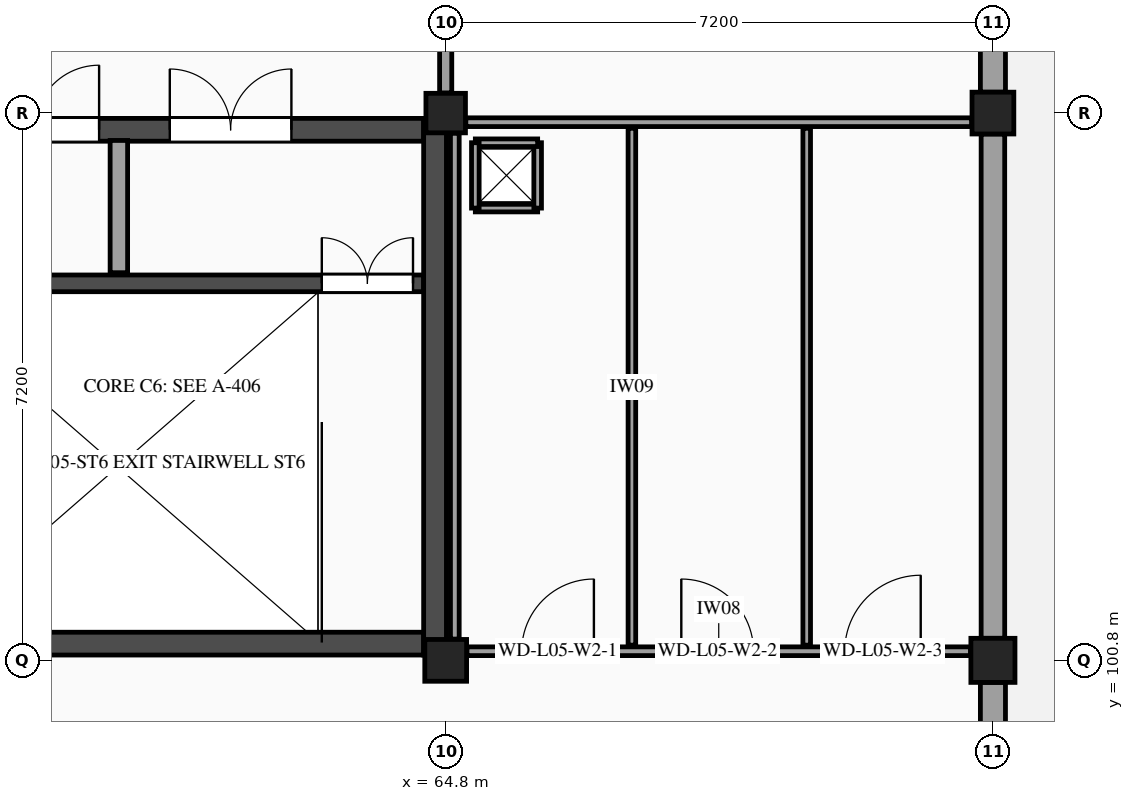
"""IFC4 building model, lengths in metres.
Left out: names, types, materials, properties, quantities, classifications, styles, units other than length and angle.
Written with IfcOpenShell. Run it as: python <this file> out.ifc"""

import sys

from ifc_helpers import new_model, si_unit, direction, frame, frame_2d, origin, origin_2d, place, context, subcontext, project, spatial, rectangle, extrude, element, fill, save


model = new_model("IFC4")
c1 = context("Model", 3, precision=1e-05, world=origin(), true_north=direction((0.0, 1.0)))
c2 = subcontext(c1, "Body", "Model", "MODEL_VIEW")
j1 = project(units=[si_unit("LENGTHUNIT", "METRE"), si_unit("PLANEANGLEUNIT", "RADIAN")], contexts=[c1])
p1 = place(None, origin())
s1 = spatial("IfcSite", under=j1, at=p1, CompositionType="ELEMENT")
p2 = place(p1, origin())
s2 = spatial("IfcBuilding", under=s1, at=p2, CompositionType="ELEMENT")
p3 = place(p2, frame((0.0, 0.0, 22.8)))
s3 = spatial("IfcBuildingStorey", under=s2, at=p3, CompositionType="ELEMENT", Elevation=22.8)
p4 = place(p3, frame((64.8, 100.8, 0.0), z_axis=(0.0, 0.0, 1.0), x_axis=(1.0, 0.0, 0.0)))
e1 = element("IfcColumn", 1, at=p4, inside=s3, PredefinedType="COLUMN", context=c2, shape_type="SweptSolid", body=[
    extrude(rectangle(XDim=0.55, YDim=0.55, at=origin_2d()), origin(), (0.0, 0.0, 1.0), 3.9),
])
p5 = place(p3, frame((64.8, 108.0, 0.0), z_axis=(0.0, 0.0, 1.0), x_axis=(1.0, 0.0, 0.0)))
e2 = element("IfcColumn", 2, at=p5, inside=s3, PredefinedType="COLUMN", context=c2, shape_type="SweptSolid", body=[
    extrude(rectangle(XDim=0.52, YDim=0.52, at=origin_2d()), origin(), (0.0, 0.0, 1.0), 3.9),
])
p6 = place(p3, frame((72.0, 100.8, 0.0), z_axis=(0.0, 0.0, 1.0), x_axis=(1.0, 0.0, 0.0)))
e3 = element("IfcColumn", 3, at=p6, inside=s3, PredefinedType="COLUMN", context=c2, shape_type="SweptSolid", body=[
    extrude(rectangle(XDim=0.58, YDim=0.58, at=origin_2d()), origin(), (0.0, 0.0, 1.0), 3.9),
])
p7 = place(p3, frame((72.0, 108.0, 0.0), z_axis=(0.0, 0.0, 1.0), x_axis=(1.0, 0.0, 0.0)))
e4 = element("IfcColumn", 4, at=p7, inside=s3, PredefinedType="COLUMN", context=c2, shape_type="SweptSolid", body=[
    extrude(rectangle(XDim=0.55, YDim=0.55, at=origin_2d()), origin(), (0.0, 0.0, 1.0), 3.9),
])
p8 = place(p3, frame((72.0, 114.94, 0.0), z_axis=(0.0, 0.0, 1.0), x_axis=(0.0, -1.0, 0.0)))
e5 = element("IfcWall", 5, at=p8, inside=s3, PredefinedType="STANDARD", context=c2, shape_type="SweptSolid", body=[
    extrude(rectangle(XDim=6.665, YDim=0.33, at=frame_2d((3.333, 0.0))), origin(), (0.0, 0.0, 1.0), 3.095),
])
p9 = place(p8, frame((2.782, 0.0, 0.0)))
e6 = element("IfcOpeningElement", 6, at=p9, cuts=e5, PredefinedType="OPENING", context=c2, shape_type="SweptSolid", body=[
    extrude(rectangle(XDim=1.1, YDim=2.2, at=frame_2d((0.55, 1.1))), frame((0.0, 0.175, 0.0), z_axis=(0.0, -1.0, 0.0), x_axis=(1.0, 0.0, 0.0)), (0.0, 0.0, 1.0), 0.35),
])
p10 = place(p3, frame((72.0, 107.725, 0.0), z_axis=(0.0, 0.0, 1.0), x_axis=(0.0, -1.0, 0.0)))
e7 = element("IfcWall", 7, at=p10, inside=s3, PredefinedType="STANDARD", context=c2, shape_type="SweptSolid", body=[
    extrude(rectangle(XDim=6.635, YDim=0.31, at=frame_2d((3.317, 0.0))), origin(), (0.0, 0.0, 1.0), 3.095),
])
p11 = place(p3, frame((72.0, 100.51, 0.0), z_axis=(0.0, 0.0, 1.0), x_axis=(0.0, -1.0, 0.0)))
e8 = element("IfcWall", 8, at=p11, inside=s3, PredefinedType="STANDARD", context=c2, shape_type="SweptSolid", body=[
    extrude(rectangle(XDim=6.66, YDim=0.33, at=frame_2d((3.33, 0.0))), origin(), (0.0, 0.0, 1.0), 3.095),
])
p12 = place(p11, frame((1.73, 0.0, 0.95)))
e9 = element("IfcOpeningElement", 9, at=p12, cuts=e8, PredefinedType="OPENING", context=c2, shape_type="SweptSolid", body=[
    extrude(rectangle(XDim=3.2, YDim=1.45, at=frame_2d((1.6, 0.725))), frame((0.0, 0.175, 0.0), z_axis=(0.0, -1.0, 0.0), x_axis=(1.0, 0.0, 0.0)), (0.0, 0.0, 1.0), 0.35),
])
p13 = place(p3, frame((57.97, 101.02, 0.0), z_axis=(0.0, 0.0, 1.0), x_axis=(1.0, 0.0, 0.0)))
e10 = element("IfcWall", 10, at=p13, inside=s3, PredefinedType="SHEAR", context=c2, shape_type="SweptSolid", body=[
    extrude(rectangle(XDim=6.54, YDim=0.3, at=frame_2d((3.27, 0.0))), origin(), (0.0, 0.0, 1.0), 3.67),
])
p14 = place(p3, frame((57.97, 107.78, 0.0), z_axis=(0.0, 0.0, 1.0), x_axis=(1.0, 0.0, 0.0)))
e11 = element("IfcWall", 11, at=p14, inside=s3, PredefinedType="SHEAR", context=c2, shape_type="SweptSolid", body=[
    extrude(rectangle(XDim=6.54, YDim=0.3, at=frame_2d((3.27, 0.0))), origin(), (0.0, 0.0, 1.0), 3.67),
])
p15 = place(p14, frame((1.42, 0.0, 0.0)))
e12 = element("IfcOpeningElement", 12, at=p15, cuts=e11, PredefinedType="OPENING", context=c2, shape_type="SweptSolid", body=[
    extrude(rectangle(XDim=0.85, YDim=2.1, at=frame_2d((0.425, 1.05))), frame((0.0, 0.16, 0.0), z_axis=(0.0, -1.0, 0.0), x_axis=(1.0, 0.0, 0.0)), (0.0, 0.0, 1.0), 0.32),
])
p16 = place(p14, frame((3.2, 0.0, 0.0)))
e13 = element("IfcOpeningElement", 13, at=p16, cuts=e11, PredefinedType="OPENING", context=c2, shape_type="SweptSolid", body=[
    extrude(rectangle(XDim=1.6, YDim=2.2, at=frame_2d((0.8, 1.1))), frame((0.0, 0.16, 0.0), z_axis=(0.0, -1.0, 0.0), x_axis=(1.0, 0.0, 0.0)), (0.0, 0.0, 1.0), 0.32),
])
p17 = place(p3, frame((57.97, 105.76, 0.0), z_axis=(0.0, 0.0, 1.0), x_axis=(1.0, 0.0, 0.0)))
e14 = element("IfcWall", 14, at=p17, inside=s3, PredefinedType="SHEAR", context=c2, shape_type="SweptSolid", body=[
    extrude(rectangle(XDim=6.54, YDim=0.22, at=frame_2d((3.27, 0.0))), origin(), (0.0, 0.0, 1.0), 3.67),
])
p18 = place(p17, frame((5.2, 0.0, 0.0)))
e15 = element("IfcOpeningElement", 15, at=p18, cuts=e14, PredefinedType="OPENING", context=c2, shape_type="SweptSolid", body=[
    extrude(rectangle(XDim=1.2, YDim=2.2, at=frame_2d((0.6, 1.1))), frame((0.0, 0.12, 0.0), z_axis=(0.0, -1.0, 0.0), x_axis=(1.0, 0.0, 0.0)), (0.0, 0.0, 1.0), 0.24),
])
p19 = place(p3, frame((60.5, 105.9, 0.0), z_axis=(0.0, 0.0, 1.0), x_axis=(0.0, 1.0, 0.0)))
e16 = element("IfcWall", 16, at=p19, inside=s3, PredefinedType="PARTITIONING", context=c2, shape_type="SweptSolid", body=[
    extrude(rectangle(XDim=1.74, YDim=0.23, at=frame_2d((0.87, 0.0))), origin(), (0.0, 0.0, 1.0), 3.67),
])
p20 = place(p3, frame((64.66, 100.87, 0.0), z_axis=(0.0, 0.0, 1.0), x_axis=(0.0, 1.0, 0.0)))
e17 = element("IfcWall", 17, at=p20, inside=s3, PredefinedType="SHEAR", context=c2, shape_type="SweptSolid", body=[
    extrude(rectangle(XDim=7.06, YDim=0.3, at=frame_2d((3.53, 0.0))), origin(), (0.0, 0.0, 1.0), 3.67),
])
p21 = place(p3, frame((65.08, 100.92, 0.0), z_axis=(0.0, 0.0, 1.0), x_axis=(1.0, 0.0, 0.0)))
e18 = element("IfcWall", 18, at=p21, inside=s3, PredefinedType="PARTITIONING", context=c2, shape_type="SweptSolid", body=[
    extrude(rectangle(XDim=6.625, YDim=0.115, at=frame_2d((3.312, 0.0))), origin(), (0.0, 0.0, 1.0), 3.18),
])
p22 = place(p21, frame((0.72, 0.0, 0.0)))
e19 = element("IfcOpeningElement", 19, at=p22, cuts=e18, PredefinedType="OPENING", context=c2, shape_type="SweptSolid", body=[
    extrude(rectangle(XDim=0.95, YDim=2.1, at=frame_2d((0.475, 1.05))), frame((0.0, 0.067, 0.0), z_axis=(0.0, -1.0, 0.0), x_axis=(1.0, 0.0, 0.0)), (0.0, 0.0, 1.0), 0.135),
])
p23 = place(p21, frame((2.82, 0.0, 0.0)))
e20 = element("IfcOpeningElement", 20, at=p23, cuts=e18, PredefinedType="OPENING", context=c2, shape_type="SweptSolid", body=[
    extrude(rectangle(XDim=0.95, YDim=2.1, at=frame_2d((0.475, 1.05))), frame((0.0, 0.067, 0.0), z_axis=(0.0, -1.0, 0.0), x_axis=(1.0, 0.0, 0.0)), (0.0, 0.0, 1.0), 0.135),
])
p24 = place(p21, frame((4.97, 0.0, 0.0)))
e21 = element("IfcOpeningElement", 21, at=p24, cuts=e18, PredefinedType="OPENING", context=c2, shape_type="SweptSolid", body=[
    extrude(rectangle(XDim=1.0, YDim=2.15, at=frame_2d((0.5, 1.075))), frame((0.0, 0.067, 0.0), z_axis=(0.0, -1.0, 0.0), x_axis=(1.0, 0.0, 0.0)), (0.0, 0.0, 1.0), 0.135),
])
p25 = place(p3, frame((65.065, 107.88, 0.0), z_axis=(0.0, 0.0, 1.0), x_axis=(1.0, 0.0, 0.0)))
e22 = element("IfcWall", 22, at=p25, inside=s3, PredefinedType="PARTITIONING", context=c2, shape_type="SweptSolid", body=[
    extrude(rectangle(XDim=6.655, YDim=0.115, at=frame_2d((3.328, 0.0))), origin(), (0.0, 0.0, 1.0), 3.18),
])
p26 = place(p3, frame((64.92, 101.08, 0.0), z_axis=(0.0, 0.0, 1.0), x_axis=(0.0, 1.0, 0.0)))
e23 = element("IfcWall", 23, at=p26, inside=s3, PredefinedType="PARTITIONING", context=c2, shape_type="SweptSolid", body=[
    extrude(rectangle(XDim=6.655, YDim=0.115, at=frame_2d((3.328, 0.0))), origin(), (0.0, 0.0, 1.0), 3.205),
])
for number, where, z_axis, x_axis in (
    (24, (67.25, 101.0, 0.0), (0.0, 0.0, 1.0), (0.0, 1.0, 0.0)),
    (25, (69.55, 101.0, 0.0), (0.0, 0.0, 1.0), (0.0, 1.0, 0.0)),
):
    element("IfcWall", number, at=place(p3, frame(where, z_axis=z_axis, x_axis=x_axis)), inside=s3, PredefinedType="PARTITIONING", context=c2, shape_type="SweptSolid", body=[
        extrude(rectangle(XDim=6.8, YDim=0.1, at=frame_2d((3.4, 0.0))), origin(), (0.0, 0.0, 1.0), 3.67),
    ])
p27 = place(p3, frame((65.19, 106.75, 0.0), z_axis=(0.0, 0.0, 1.0), x_axis=(1.0, 0.0, 0.0)))
e26 = element("IfcWall", 26, at=p27, inside=s3, PredefinedType="PARTITIONING", context=c2, shape_type="SweptSolid", body=[
    extrude(rectangle(XDim=0.82, YDim=0.1, at=frame_2d((0.41, 0.0))), origin(), (0.0, 0.0, 1.0), 3.67),
])
p28 = place(p3, frame((66.01, 106.75, 0.0), z_axis=(0.0, 0.0, 1.0), x_axis=(0.0, 1.0, 0.0)))
e27 = element("IfcWall", 27, at=p28, inside=s3, PredefinedType="PARTITIONING", context=c2, shape_type="SweptSolid", body=[
    extrude(rectangle(XDim=0.86, YDim=0.1, at=frame_2d((0.43, 0.0))), origin(), (0.0, 0.0, 1.0), 3.67),
])
p29 = place(p3, frame((66.01, 107.61, 0.0), z_axis=(0.0, 0.0, 1.0), x_axis=(-1.0, 0.0, 0.0)))
e28 = element("IfcWall", 28, at=p29, inside=s3, PredefinedType="PARTITIONING", context=c2, shape_type="SweptSolid", body=[
    extrude(rectangle(XDim=0.82, YDim=0.1, at=frame_2d((0.41, 0.0))), origin(), (0.0, 0.0, 1.0), 3.67),
])
p30 = place(p3, frame((65.19, 107.61, 0.0), z_axis=(0.0, 0.0, 1.0), x_axis=(0.0, -1.0, 0.0)))
e29 = element("IfcWall", 29, at=p30, inside=s3, PredefinedType="PARTITIONING", context=c2, shape_type="SweptSolid", body=[
    extrude(rectangle(XDim=0.86, YDim=0.1, at=frame_2d((0.43, 0.0))), origin(), (0.0, 0.0, 1.0), 3.67),
])
p31 = place(p3, frame((64.8, 108.265, 0.0), z_axis=(0.0, 0.0, 1.0), x_axis=(0.0, 1.0, 0.0)))
e30 = element("IfcWall", 30, at=p31, inside=s3, PredefinedType="PARTITIONING", context=c2, shape_type="SweptSolid", body=[
    extrude(rectangle(XDim=6.68, YDim=0.16, at=frame_2d((3.34, 0.0))), origin(), (0.0, 0.0, 1.0), 3.27),
])
p32 = place(p15, origin())
e31 = element("IfcDoor", 31, at=p32, inside=s3, OperationType="SINGLE_SWING_RIGHT", PredefinedType="DOOR", context=c2, shape_type="SweptSolid", body=[
    extrude(rectangle(XDim=0.85, YDim=2.1, at=frame_2d((0.425, 1.05))), frame((0.0, 0.025, 0.0), z_axis=(0.0, -1.0, 0.0), x_axis=(1.0, 0.0, 0.0)), (0.0, 0.0, 1.0), 0.05),
])
fill(e12, e31)
p33 = place(p18, origin())
e32 = element("IfcDoor", 32, at=p33, inside=s3, OperationType="DOUBLE_DOOR_SINGLE_SWING", PredefinedType="DOOR", context=c2, shape_type="SweptSolid", body=[
    extrude(rectangle(XDim=1.2, YDim=2.2, at=frame_2d((0.6, 1.1))), frame((0.0, 0.025, 0.0), z_axis=(0.0, -1.0, 0.0), x_axis=(1.0, 0.0, 0.0)), (0.0, 0.0, 1.0), 0.05),
])
fill(e15, e32)
p34 = place(p16, frame((1.6, 0.0, 0.0), z_axis=(0.0, 0.0, 1.0), x_axis=(-1.0, 0.0, 0.0)))
e33 = element("IfcDoor", 33, at=p34, inside=s3, OperationType="DOUBLE_DOOR_SINGLE_SWING", PredefinedType="DOOR", context=c2, shape_type="SweptSolid", body=[
    extrude(rectangle(XDim=1.6, YDim=2.2, at=frame_2d((0.8, 1.1))), frame((0.0, 0.025, 0.0), z_axis=(0.0, -1.0, 0.0), x_axis=(1.0, 0.0, 0.0)), (0.0, 0.0, 1.0), 0.05),
])
fill(e13, e33)
p35 = place(p22, origin())
e34 = element("IfcDoor", 34, at=p35, inside=s3, OperationType="SINGLE_SWING_RIGHT", PredefinedType="DOOR", context=c2, shape_type="SweptSolid", body=[
    extrude(rectangle(XDim=0.95, YDim=2.1, at=frame_2d((0.475, 1.05))), frame((0.0, 0.025, 0.0), z_axis=(0.0, -1.0, 0.0), x_axis=(1.0, 0.0, 0.0)), (0.0, 0.0, 1.0), 0.05),
])
fill(e19, e34)
p36 = place(p23, origin())
e35 = element("IfcDoor", 35, at=p36, inside=s3, OperationType="SINGLE_SWING_LEFT", PredefinedType="DOOR", context=c2, shape_type="SweptSolid", body=[
    extrude(rectangle(XDim=0.95, YDim=2.1, at=frame_2d((0.475, 1.05))), frame((0.0, 0.025, 0.0), z_axis=(0.0, -1.0, 0.0), x_axis=(1.0, 0.0, 0.0)), (0.0, 0.0, 1.0), 0.05),
])
fill(e20, e35)
p37 = place(p24, origin())
e36 = element("IfcDoor", 36, at=p37, inside=s3, OperationType="SINGLE_SWING_RIGHT", PredefinedType="DOOR", context=c2, shape_type="SweptSolid", body=[
    extrude(rectangle(XDim=1.0, YDim=2.15, at=frame_2d((0.5, 1.075))), frame((0.0, 0.025, 0.0), z_axis=(0.0, -1.0, 0.0), x_axis=(1.0, 0.0, 0.0)), (0.0, 0.0, 1.0), 0.05),
])
fill(e21, e36)
save(model, sys.argv[1])
